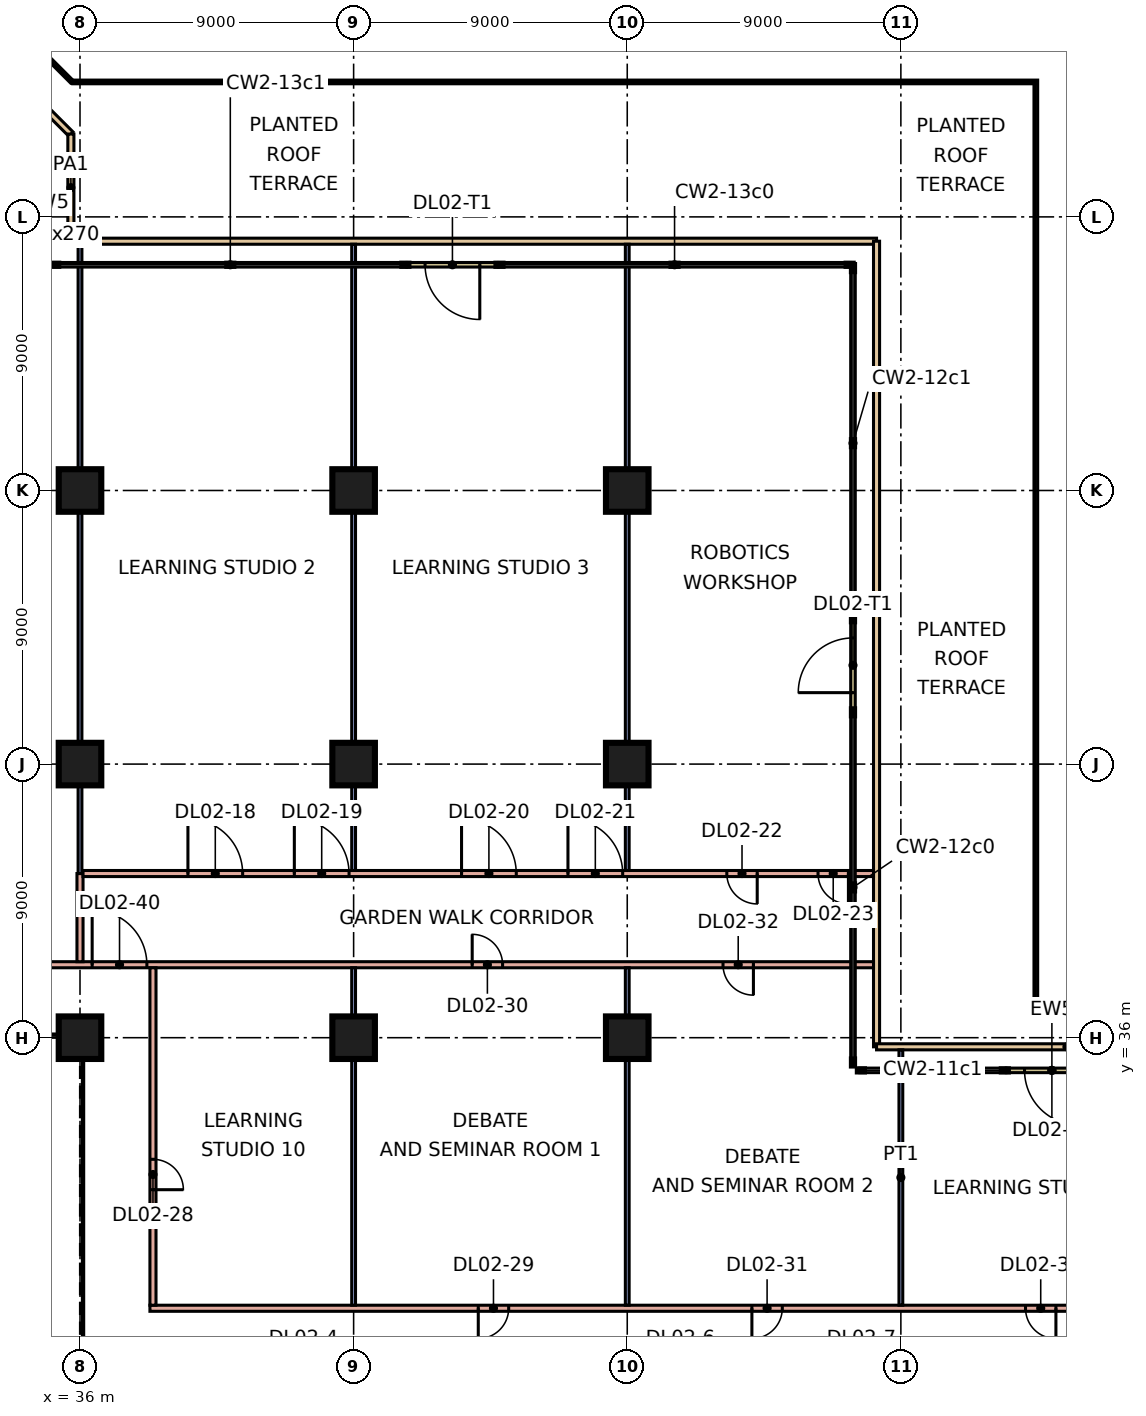
"""IFC4 building model, lengths in metres.
Left out: names, types, materials, properties, quantities, classifications, styles, units other than length and angle.
Written with IfcOpenShell. Run it as: python <this file> out.ifc"""

import sys

from ifc_helpers import new_model, si_unit, direction, frame, frame_2d, origin, origin_2d, place, context, subcontext, project, spatial, rectangle, extrude, element, fill, save


model = new_model("IFC4")
c1 = context("Model", 3, precision=1e-05, world=origin(), true_north=direction((0.0, 1.0)))
c2 = subcontext(c1, "Body", "Model", "MODEL_VIEW")
j1 = project(units=[si_unit("LENGTHUNIT", "METRE"), si_unit("PLANEANGLEUNIT", "RADIAN")], contexts=[c1])
p1 = place(None, origin())
s1 = spatial("IfcSite", under=j1, at=p1, CompositionType="ELEMENT")
p2 = place(p1, origin())
s2 = spatial("IfcBuilding", under=s1, at=p2, CompositionType="ELEMENT")
p3 = place(p2, frame((0.0, 0.0, 12.0)))
s3 = spatial("IfcBuildingStorey", under=s2, at=p3, CompositionType="ELEMENT", Elevation=12.0)
for number, where, z_axis, x_axis in (
    (1, (36.0, 36.0, 0.0), (0.0, 0.0, 1.0), (1.0, 0.0, 0.0)),
    (2, (45.0, 36.0, 0.0), (0.0, 0.0, 1.0), (1.0, 0.0, 0.0)),
    (3, (54.0, 36.0, 0.0), (0.0, 0.0, 1.0), (1.0, 0.0, 0.0)),
    (4, (36.0, 45.0, 0.0), (0.0, 0.0, 1.0), (1.0, 0.0, 0.0)),
    (5, (45.0, 45.0, 0.0), (0.0, 0.0, 1.0), (1.0, 0.0, 0.0)),
    (6, (54.0, 45.0, 0.0), (0.0, 0.0, 1.0), (1.0, 0.0, 0.0)),
    (7, (36.0, 54.0, 0.0), (0.0, 0.0, 1.0), (1.0, 0.0, 0.0)),
    (8, (45.0, 54.0, 0.0), (0.0, 0.0, 1.0), (1.0, 0.0, 0.0)),
    (9, (54.0, 54.0, 0.0), (0.0, 0.0, 1.0), (1.0, 0.0, 0.0)),
):
    element("IfcColumn", number, at=place(p3, frame(where, z_axis=z_axis, x_axis=x_axis)), inside=s3, PredefinedType="COLUMN", context=c2, shape_type="SweptSolid", body=[
        extrude(rectangle(XDim=1.4, YDim=1.4, at=origin_2d()), origin(), (0.0, 0.0, 1.0), 4.8),
    ])
p4 = place(p3, frame((69.468, 34.925, 0.0), z_axis=(0.0, 0.0, 1.0), x_axis=(-1.0, 0.0, 0.0)))
e10 = element("IfcWall", 10, at=p4, inside=s3, PredefinedType="SOLIDWALL", context=c2, shape_type="SweptSolid", body=[
    extrude(rectangle(XDim=3.0, YDim=0.15, at=frame_2d((1.5, 0.0))), origin(), (0.0, 0.0, 1.0), 4.4),
])
p5 = place(p4, frame((0.6, 0.0, 0.0)))
e11 = element("IfcOpeningElement", 11, at=p5, cuts=e10, PredefinedType="OPENING", context=c2, shape_type="SweptSolid", body=[
    extrude(rectangle(XDim=1.8, YDim=2.4, at=frame_2d((0.9, 1.2))), frame((0.0, 0.085, 0.0), z_axis=(0.0, -1.0, 0.0), x_axis=(1.0, 0.0, 0.0)), (0.0, 0.0, 1.0), 0.17),
])
p6 = place(p3, frame((61.425, 46.75, 0.0), z_axis=(0.0, 0.0, 1.0), x_axis=(0.0, 1.0, 0.0)))
e12 = element("IfcWall", 12, at=p6, inside=s3, PredefinedType="SOLIDWALL", context=c2, shape_type="SweptSolid", body=[
    extrude(rectangle(XDim=3.0, YDim=0.15, at=frame_2d((1.5, 0.0))), origin(), (0.0, 0.0, 1.0), 4.4),
])
p7 = place(p6, frame((0.6, 0.0, 0.0)))
e13 = element("IfcOpeningElement", 13, at=p7, cuts=e12, PredefinedType="OPENING", context=c2, shape_type="SweptSolid", body=[
    extrude(rectangle(XDim=1.8, YDim=2.4, at=frame_2d((0.9, 1.2))), frame((0.0, 0.085, 0.0), z_axis=(0.0, -1.0, 0.0), x_axis=(1.0, 0.0, 0.0)), (0.0, 0.0, 1.0), 0.17),
])
p8 = place(p3, frame((49.75, 61.425, 0.0), z_axis=(0.0, 0.0, 1.0), x_axis=(-1.0, 0.0, 0.0)))
e14 = element("IfcWall", 14, at=p8, inside=s3, PredefinedType="SOLIDWALL", context=c2, shape_type="SweptSolid", body=[
    extrude(rectangle(XDim=3.0, YDim=0.15, at=frame_2d((1.5, 0.0))), origin(), (0.0, 0.0, 1.0), 4.4),
])
p9 = place(p8, frame((0.6, 0.0, 0.0)))
e15 = element("IfcOpeningElement", 15, at=p9, cuts=e14, PredefinedType="OPENING", context=c2, shape_type="SweptSolid", body=[
    extrude(rectangle(XDim=1.8, YDim=2.4, at=frame_2d((0.9, 1.2))), frame((0.0, 0.085, 0.0), z_axis=(0.0, -1.0, 0.0), x_axis=(1.0, 0.0, 0.0)), (0.0, 0.0, 1.0), 0.17),
])
for number, where, z_axis, x_axis in (
    (16, (35.7, 62.2, 0.0), (0.0, 0.0, 1.0), (1.0, 0.0, 0.0)),
    (17, (62.2, 62.2, 0.0), (0.0, 0.0, 1.0), (0.0, -1.0, 0.0)),
):
    element("IfcWall", number, at=place(p3, frame(where, z_axis=z_axis, x_axis=x_axis)), inside=s3, PredefinedType="PARAPET", context=c2, shape_type="SweptSolid", body=[
        extrude(rectangle(XDim=26.5, YDim=0.2, at=frame_2d((13.25, 0.0))), origin(), (0.0, 0.0, 1.0), 0.5),
    ])
p10 = place(p3, frame((62.2, 35.7, 0.0), z_axis=(0.0, 0.0, 1.0), x_axis=(1.0, 0.0, 0.0)))
e18 = element("IfcWall", 18, at=p10, inside=s3, PredefinedType="PARAPET", context=c2, shape_type="SweptSolid", body=[
    extrude(rectangle(XDim=12.525, YDim=0.2, at=frame_2d((6.263, 0.0))), origin(), (0.0, 0.0, 1.0), 0.5),
])
p11 = place(p3, frame((26.725, 74.7, 0.0), z_axis=(0.0, 0.0, 1.0), x_axis=(0.707106781187, -0.707106781187, 0.0)))
e19 = element("IfcWall", 19, at=p11, inside=s3, PredefinedType="PARAPET", context=c2, shape_type="SweptSolid", body=[
    extrude(rectangle(XDim=12.692, YDim=0.2, at=frame_2d((6.346, 0.0))), origin(), (0.0, 0.0, 1.0), 0.5),
])
p12 = place(p3, frame((35.7, 65.725, 0.0), z_axis=(0.0, 0.0, 1.0), x_axis=(0.0, -1.0, 0.0)))
e20 = element("IfcWall", 20, at=p12, inside=s3, PredefinedType="PARAPET", context=c2, shape_type="SweptSolid", body=[
    extrude(rectangle(XDim=3.525, YDim=0.2, at=frame_2d((1.763, 0.0))), origin(), (0.0, 0.0, 1.0), 0.5),
])
p13 = place(p3, frame((27.0, 38.4, 0.0), z_axis=(0.0, 0.0, 1.0), x_axis=(1.0, 0.0, 0.0)))
e21 = element("IfcWall", 21, at=p13, inside=s3, PredefinedType="PARTITIONING", context=c2, shape_type="SweptSolid", body=[
    extrude(rectangle(XDim=35.1, YDim=0.2, at=frame_2d((17.55, 0.0))), origin(), (0.0, 0.0, 1.0), 4.4),
])
p14 = place(p13, frame((21.9, 0.0, 0.0)))
e22 = element("IfcOpeningElement", 22, at=p14, cuts=e21, PredefinedType="OPENING", context=c2, shape_type="SweptSolid", body=[
    extrude(rectangle(XDim=1.0, YDim=2.1, at=frame_2d((0.5, 1.05))), frame((0.0, 0.11, 0.0), z_axis=(0.0, -1.0, 0.0), x_axis=(1.0, 0.0, 0.0)), (0.0, 0.0, 1.0), 0.22),
])
p15 = place(p13, frame((30.15, 0.0, 0.0)))
e23 = element("IfcOpeningElement", 23, at=p15, cuts=e21, PredefinedType="OPENING", context=c2, shape_type="SweptSolid", body=[
    extrude(rectangle(XDim=1.0, YDim=2.1, at=frame_2d((0.5, 1.05))), frame((0.0, 0.11, 0.0), z_axis=(0.0, -1.0, 0.0), x_axis=(1.0, 0.0, 0.0)), (0.0, 0.0, 1.0), 0.22),
])
p16 = place(p13, frame((9.4, 0.0, 0.0)))
e24 = element("IfcOpeningElement", 24, at=p16, cuts=e21, PredefinedType="OPENING", context=c2, shape_type="SweptSolid", body=[
    extrude(rectangle(XDim=1.8, YDim=2.1, at=frame_2d((0.9, 1.05))), frame((0.0, 0.11, 0.0), z_axis=(0.0, -1.0, 0.0), x_axis=(1.0, 0.0, 0.0)), (0.0, 0.0, 1.0), 0.22),
])
p17 = place(p3, frame((36.0, 38.5, 0.0), z_axis=(0.0, 0.0, 1.0), x_axis=(0.0, 1.0, 0.0)))
e25 = element("IfcWall", 25, at=p17, inside=s3, PredefinedType="PARTITIONING", context=c2, shape_type="SweptSolid", body=[
    extrude(rectangle(XDim=2.9, YDim=0.2, at=frame_2d((1.45, 0.0))), origin(), (0.0, 0.0, 1.0), 4.4),
])
p18 = place(p3, frame((36.0, 41.4, 0.0), z_axis=(0.0, 0.0, 1.0), x_axis=(0.0, 1.0, 0.0)))
e26 = element("IfcWall", 26, at=p18, inside=s3, PredefinedType="PARTITIONING", context=c2, shape_type="SweptSolid", body=[
    extrude(rectangle(XDim=20.7, YDim=0.125, at=frame_2d((10.35, 0.0))), origin(), (0.0, 0.0, 1.0), 4.4),
])
p19 = place(p3, frame((36.1, 41.4, 0.0), z_axis=(0.0, 0.0, 1.0), x_axis=(1.0, 0.0, 0.0)))
e27 = element("IfcWall", 27, at=p19, inside=s3, PredefinedType="PARTITIONING", context=c2, shape_type="SweptSolid", body=[
    extrude(rectangle(XDim=26.0, YDim=0.2, at=frame_2d((13.0, 0.0))), origin(), (0.0, 0.0, 1.0), 4.4),
])
p20 = place(p19, frame((3.45, 0.0, 0.0)))
e28 = element("IfcOpeningElement", 28, at=p20, cuts=e27, PredefinedType="OPENING", context=c2, shape_type="SweptSolid", body=[
    extrude(rectangle(XDim=1.8, YDim=2.1, at=frame_2d((0.9, 1.05))), frame((0.0, 0.11, 0.0), z_axis=(0.0, -1.0, 0.0), x_axis=(1.0, 0.0, 0.0)), (0.0, 0.0, 1.0), 0.22),
])
p21 = place(p19, frame((6.95, 0.0, 0.0)))
e29 = element("IfcOpeningElement", 29, at=p21, cuts=e27, PredefinedType="OPENING", context=c2, shape_type="SweptSolid", body=[
    extrude(rectangle(XDim=1.8, YDim=2.1, at=frame_2d((0.9, 1.05))), frame((0.0, 0.11, 0.0), z_axis=(0.0, -1.0, 0.0), x_axis=(1.0, 0.0, 0.0)), (0.0, 0.0, 1.0), 0.22),
])
p22 = place(p19, frame((12.45, 0.0, 0.0)))
e30 = element("IfcOpeningElement", 30, at=p22, cuts=e27, PredefinedType="OPENING", context=c2, shape_type="SweptSolid", body=[
    extrude(rectangle(XDim=1.8, YDim=2.1, at=frame_2d((0.9, 1.05))), frame((0.0, 0.11, 0.0), z_axis=(0.0, -1.0, 0.0), x_axis=(1.0, 0.0, 0.0)), (0.0, 0.0, 1.0), 0.22),
])
p23 = place(p19, frame((15.95, 0.0, 0.0)))
e31 = element("IfcOpeningElement", 31, at=p23, cuts=e27, PredefinedType="OPENING", context=c2, shape_type="SweptSolid", body=[
    extrude(rectangle(XDim=1.8, YDim=2.1, at=frame_2d((0.9, 1.05))), frame((0.0, 0.11, 0.0), z_axis=(0.0, -1.0, 0.0), x_axis=(1.0, 0.0, 0.0)), (0.0, 0.0, 1.0), 0.22),
])
p24 = place(p19, frame((21.175, 0.0, 0.0)))
e32 = element("IfcOpeningElement", 32, at=p24, cuts=e27, PredefinedType="OPENING", context=c2, shape_type="SweptSolid", body=[
    extrude(rectangle(XDim=1.0, YDim=2.1, at=frame_2d((0.5, 1.05))), frame((0.0, 0.11, 0.0), z_axis=(0.0, -1.0, 0.0), x_axis=(1.0, 0.0, 0.0)), (0.0, 0.0, 1.0), 0.22),
])
p25 = place(p19, frame((24.175, 0.0, 0.0)))
e33 = element("IfcOpeningElement", 33, at=p25, cuts=e27, PredefinedType="OPENING", context=c2, shape_type="SweptSolid", body=[
    extrude(rectangle(XDim=1.0, YDim=2.1, at=frame_2d((0.5, 1.05))), frame((0.0, 0.11, 0.0), z_axis=(0.0, -1.0, 0.0), x_axis=(1.0, 0.0, 0.0)), (0.0, 0.0, 1.0), 0.22),
])
p26 = place(p3, frame((38.3, 27.1, 0.0), z_axis=(0.0, 0.0, 1.0), x_axis=(1.0, 0.0, 0.0)))
e34 = element("IfcWall", 34, at=p26, inside=s3, PredefinedType="PARTITIONING", context=c2, shape_type="SweptSolid", body=[
    extrude(rectangle(XDim=36.8, YDim=0.2, at=frame_2d((18.4, 0.0))), origin(), (0.0, 0.0, 1.0), 4.4),
])
p27 = place(p26, frame((10.8, 0.0, 0.0)))
e35 = element("IfcOpeningElement", 35, at=p27, cuts=e34, PredefinedType="OPENING", context=c2, shape_type="SweptSolid", body=[
    extrude(rectangle(XDim=1.0, YDim=2.1, at=frame_2d((0.5, 1.05))), frame((0.0, 0.11, 0.0), z_axis=(0.0, -1.0, 0.0), x_axis=(1.0, 0.0, 0.0)), (0.0, 0.0, 1.0), 0.22),
])
p28 = place(p26, frame((19.8, 0.0, 0.0)))
e36 = element("IfcOpeningElement", 36, at=p28, cuts=e34, PredefinedType="OPENING", context=c2, shape_type="SweptSolid", body=[
    extrude(rectangle(XDim=1.0, YDim=2.1, at=frame_2d((0.5, 1.05))), frame((0.0, 0.11, 0.0), z_axis=(0.0, -1.0, 0.0), x_axis=(1.0, 0.0, 0.0)), (0.0, 0.0, 1.0), 0.22),
])
p29 = place(p26, frame((28.8, 0.0, 0.0)))
e37 = element("IfcOpeningElement", 37, at=p29, cuts=e34, PredefinedType="OPENING", context=c2, shape_type="SweptSolid", body=[
    extrude(rectangle(XDim=1.0, YDim=2.1, at=frame_2d((0.5, 1.05))), frame((0.0, 0.11, 0.0), z_axis=(0.0, -1.0, 0.0), x_axis=(1.0, 0.0, 0.0)), (0.0, 0.0, 1.0), 0.22),
])
p30 = place(p26, frame((35.15, 0.0, 0.0)))
e38 = element("IfcOpeningElement", 38, at=p30, cuts=e34, PredefinedType="OPENING", context=c2, shape_type="SweptSolid", body=[
    extrude(rectangle(XDim=1.0, YDim=2.1, at=frame_2d((0.5, 1.05))), frame((0.0, 0.11, 0.0), z_axis=(0.0, -1.0, 0.0), x_axis=(1.0, 0.0, 0.0)), (0.0, 0.0, 1.0), 0.22),
])
p31 = place(p3, frame((38.4, 27.2, 0.0), z_axis=(0.0, 0.0, 1.0), x_axis=(0.0, 1.0, 0.0)))
e39 = element("IfcWall", 39, at=p31, inside=s3, PredefinedType="PARTITIONING", context=c2, shape_type="SweptSolid", body=[
    extrude(rectangle(XDim=11.1, YDim=0.2, at=frame_2d((5.55, 0.0))), origin(), (0.0, 0.0, 1.0), 4.4),
])
p32 = place(p31, frame((3.8, 0.0, 0.0)))
e40 = element("IfcOpeningElement", 40, at=p32, cuts=e39, PredefinedType="OPENING", context=c2, shape_type="SweptSolid", body=[
    extrude(rectangle(XDim=1.0, YDim=2.1, at=frame_2d((0.5, 1.05))), frame((0.0, 0.11, 0.0), z_axis=(0.0, -1.0, 0.0), x_axis=(1.0, 0.0, 0.0)), (0.0, 0.0, 1.0), 0.22),
])
p33 = place(p3, frame((45.0, 27.2, 0.0), z_axis=(0.0, 0.0, 1.0), x_axis=(0.0, 1.0, 0.0)))
e41 = element("IfcWall", 41, at=p33, inside=s3, PredefinedType="PARTITIONING", context=c2, shape_type="SweptSolid", body=[
    extrude(rectangle(XDim=11.1, YDim=0.125, at=frame_2d((5.55, 0.0))), origin(), (0.0, 0.0, 1.0), 4.4),
])
p34 = place(p3, frame((45.0, 41.5, 0.0), z_axis=(0.0, 0.0, 1.0), x_axis=(0.0, 1.0, 0.0)))
e42 = element("IfcWall", 42, at=p34, inside=s3, PredefinedType="PARTITIONING", context=c2, shape_type="SweptSolid", body=[
    extrude(rectangle(XDim=20.6, YDim=0.125, at=frame_2d((10.3, 0.0))), origin(), (0.0, 0.0, 1.0), 4.4),
])
p35 = place(p3, frame((54.0, 27.2, 0.0), z_axis=(0.0, 0.0, 1.0), x_axis=(0.0, 1.0, 0.0)))
e43 = element("IfcWall", 43, at=p35, inside=s3, PredefinedType="PARTITIONING", context=c2, shape_type="SweptSolid", body=[
    extrude(rectangle(XDim=11.1, YDim=0.125, at=frame_2d((5.55, 0.0))), origin(), (0.0, 0.0, 1.0), 4.4),
])
p36 = place(p3, frame((54.0, 41.5, 0.0), z_axis=(0.0, 0.0, 1.0), x_axis=(0.0, 1.0, 0.0)))
e44 = element("IfcWall", 44, at=p36, inside=s3, PredefinedType="PARTITIONING", context=c2, shape_type="SweptSolid", body=[
    extrude(rectangle(XDim=20.6, YDim=0.125, at=frame_2d((10.3, 0.0))), origin(), (0.0, 0.0, 1.0), 4.4),
])
p37 = place(p3, frame((63.0, 27.2, 0.0), z_axis=(0.0, 0.0, 1.0), x_axis=(0.0, 1.0, 0.0)))
e45 = element("IfcWall", 45, at=p37, inside=s3, PredefinedType="PARTITIONING", context=c2, shape_type="SweptSolid", body=[
    extrude(rectangle(XDim=8.4, YDim=0.125, at=frame_2d((4.2, 0.0))), origin(), (0.0, 0.0, 1.0), 4.4),
])
p38 = place(p5, origin())
e46 = element("IfcDoor", 46, at=p38, inside=s3, OperationType="DOUBLE_DOOR_SINGLE_SWING", PredefinedType="DOOR", context=c2, shape_type="SweptSolid", body=[
    extrude(rectangle(XDim=1.8, YDim=2.4, at=frame_2d((0.9, 1.2))), frame((0.0, 0.025, 0.0), z_axis=(0.0, -1.0, 0.0), x_axis=(1.0, 0.0, 0.0)), (0.0, 0.0, 1.0), 0.05),
])
fill(e11, e46)
p39 = place(p7, origin())
e47 = element("IfcDoor", 47, at=p39, inside=s3, OperationType="DOUBLE_DOOR_SINGLE_SWING", PredefinedType="DOOR", context=c2, shape_type="SweptSolid", body=[
    extrude(rectangle(XDim=1.8, YDim=2.4, at=frame_2d((0.9, 1.2))), frame((0.0, 0.025, 0.0), z_axis=(0.0, -1.0, 0.0), x_axis=(1.0, 0.0, 0.0)), (0.0, 0.0, 1.0), 0.05),
])
fill(e13, e47)
p40 = place(p9, origin())
e48 = element("IfcDoor", 48, at=p40, inside=s3, OperationType="DOUBLE_DOOR_SINGLE_SWING", PredefinedType="DOOR", context=c2, shape_type="SweptSolid", body=[
    extrude(rectangle(XDim=1.8, YDim=2.4, at=frame_2d((0.9, 1.2))), frame((0.0, 0.025, 0.0), z_axis=(0.0, -1.0, 0.0), x_axis=(1.0, 0.0, 0.0)), (0.0, 0.0, 1.0), 0.05),
])
fill(e15, e48)
p41 = place(p20, origin())
e49 = element("IfcDoor", 49, at=p41, inside=s3, OperationType="DOUBLE_DOOR_SINGLE_SWING", PredefinedType="DOOR", context=c2, shape_type="SweptSolid", body=[
    extrude(rectangle(XDim=1.8, YDim=2.1, at=frame_2d((0.9, 1.05))), frame((0.0, 0.025, 0.0), z_axis=(0.0, -1.0, 0.0), x_axis=(1.0, 0.0, 0.0)), (0.0, 0.0, 1.0), 0.05),
])
fill(e28, e49)
p42 = place(p21, origin())
e50 = element("IfcDoor", 50, at=p42, inside=s3, OperationType="DOUBLE_DOOR_SINGLE_SWING", PredefinedType="DOOR", context=c2, shape_type="SweptSolid", body=[
    extrude(rectangle(XDim=1.8, YDim=2.1, at=frame_2d((0.9, 1.05))), frame((0.0, 0.025, 0.0), z_axis=(0.0, -1.0, 0.0), x_axis=(1.0, 0.0, 0.0)), (0.0, 0.0, 1.0), 0.05),
])
fill(e29, e50)
p43 = place(p22, origin())
e51 = element("IfcDoor", 51, at=p43, inside=s3, OperationType="DOUBLE_DOOR_SINGLE_SWING", PredefinedType="DOOR", context=c2, shape_type="SweptSolid", body=[
    extrude(rectangle(XDim=1.8, YDim=2.1, at=frame_2d((0.9, 1.05))), frame((0.0, 0.025, 0.0), z_axis=(0.0, -1.0, 0.0), x_axis=(1.0, 0.0, 0.0)), (0.0, 0.0, 1.0), 0.05),
])
fill(e30, e51)
p44 = place(p23, origin())
e52 = element("IfcDoor", 52, at=p44, inside=s3, OperationType="DOUBLE_DOOR_SINGLE_SWING", PredefinedType="DOOR", context=c2, shape_type="SweptSolid", body=[
    extrude(rectangle(XDim=1.8, YDim=2.1, at=frame_2d((0.9, 1.05))), frame((0.0, 0.025, 0.0), z_axis=(0.0, -1.0, 0.0), x_axis=(1.0, 0.0, 0.0)), (0.0, 0.0, 1.0), 0.05),
])
fill(e31, e52)
p45 = place(p24, origin())
e53 = element("IfcDoor", 53, at=p45, inside=s3, OperationType="SINGLE_SWING_RIGHT", PredefinedType="DOOR", context=c2, shape_type="SweptSolid", body=[
    extrude(rectangle(XDim=1.0, YDim=2.1, at=frame_2d((0.5, 1.05))), frame((0.0, 0.025, 0.0), z_axis=(0.0, -1.0, 0.0), x_axis=(1.0, 0.0, 0.0)), (0.0, 0.0, 1.0), 0.05),
])
fill(e32, e53)
p46 = place(p25, origin())
e54 = element("IfcDoor", 54, at=p46, inside=s3, OperationType="SINGLE_SWING_RIGHT", PredefinedType="DOOR", context=c2, shape_type="SweptSolid", body=[
    extrude(rectangle(XDim=1.0, YDim=2.1, at=frame_2d((0.5, 1.05))), frame((0.0, 0.025, 0.0), z_axis=(0.0, -1.0, 0.0), x_axis=(1.0, 0.0, 0.0)), (0.0, 0.0, 1.0), 0.05),
])
fill(e33, e54)
p47 = place(p32, frame((1.0, 0.0, 0.0), z_axis=(0.0, 0.0, 1.0), x_axis=(-1.0, 0.0, 0.0)))
e55 = element("IfcDoor", 55, at=p47, inside=s3, OperationType="SINGLE_SWING_LEFT", PredefinedType="DOOR", context=c2, shape_type="SweptSolid", body=[
    extrude(rectangle(XDim=1.0, YDim=2.1, at=frame_2d((0.5, 1.05))), frame((0.0, 0.025, 0.0), z_axis=(0.0, -1.0, 0.0), x_axis=(1.0, 0.0, 0.0)), (0.0, 0.0, 1.0), 0.05),
])
fill(e40, e55)
p48 = place(p27, frame((1.0, 0.0, 0.0), z_axis=(0.0, 0.0, 1.0), x_axis=(-1.0, 0.0, 0.0)))
e56 = element("IfcDoor", 56, at=p48, inside=s3, OperationType="SINGLE_SWING_LEFT", PredefinedType="DOOR", context=c2, shape_type="SweptSolid", body=[
    extrude(rectangle(XDim=1.0, YDim=2.1, at=frame_2d((0.5, 1.05))), frame((0.0, 0.025, 0.0), z_axis=(0.0, -1.0, 0.0), x_axis=(1.0, 0.0, 0.0)), (0.0, 0.0, 1.0), 0.05),
])
fill(e35, e56)
p49 = place(p14, origin())
e57 = element("IfcDoor", 57, at=p49, inside=s3, OperationType="SINGLE_SWING_LEFT", PredefinedType="DOOR", context=c2, shape_type="SweptSolid", body=[
    extrude(rectangle(XDim=1.0, YDim=2.1, at=frame_2d((0.5, 1.05))), frame((0.0, 0.025, 0.0), z_axis=(0.0, -1.0, 0.0), x_axis=(1.0, 0.0, 0.0)), (0.0, 0.0, 1.0), 0.05),
])
fill(e22, e57)
p50 = place(p28, frame((1.0, 0.0, 0.0), z_axis=(0.0, 0.0, 1.0), x_axis=(-1.0, 0.0, 0.0)))
e58 = element("IfcDoor", 58, at=p50, inside=s3, OperationType="SINGLE_SWING_LEFT", PredefinedType="DOOR", context=c2, shape_type="SweptSolid", body=[
    extrude(rectangle(XDim=1.0, YDim=2.1, at=frame_2d((0.5, 1.05))), frame((0.0, 0.025, 0.0), z_axis=(0.0, -1.0, 0.0), x_axis=(1.0, 0.0, 0.0)), (0.0, 0.0, 1.0), 0.05),
])
fill(e36, e58)
p51 = place(p15, origin())
e59 = element("IfcDoor", 59, at=p51, inside=s3, OperationType="SINGLE_SWING_RIGHT", PredefinedType="DOOR", context=c2, shape_type="SweptSolid", body=[
    extrude(rectangle(XDim=1.0, YDim=2.1, at=frame_2d((0.5, 1.05))), frame((0.0, 0.025, 0.0), z_axis=(0.0, -1.0, 0.0), x_axis=(1.0, 0.0, 0.0)), (0.0, 0.0, 1.0), 0.05),
])
fill(e23, e59)
p52 = place(p29, origin())
e60 = element("IfcDoor", 60, at=p52, inside=s3, OperationType="SINGLE_SWING_RIGHT", PredefinedType="DOOR", context=c2, shape_type="SweptSolid", body=[
    extrude(rectangle(XDim=1.0, YDim=2.1, at=frame_2d((0.5, 1.05))), frame((0.0, 0.025, 0.0), z_axis=(0.0, -1.0, 0.0), x_axis=(1.0, 0.0, 0.0)), (0.0, 0.0, 1.0), 0.05),
])
fill(e37, e60)
p53 = place(p16, origin())
e61 = element("IfcDoor", 61, at=p53, inside=s3, OperationType="DOUBLE_DOOR_SINGLE_SWING", PredefinedType="DOOR", context=c2, shape_type="SweptSolid", body=[
    extrude(rectangle(XDim=1.8, YDim=2.1, at=frame_2d((0.9, 1.05))), frame((0.0, 0.025, 0.0), z_axis=(0.0, -1.0, 0.0), x_axis=(1.0, 0.0, 0.0)), (0.0, 0.0, 1.0), 0.05),
])
fill(e24, e61)
save(model, sys.argv[1])
